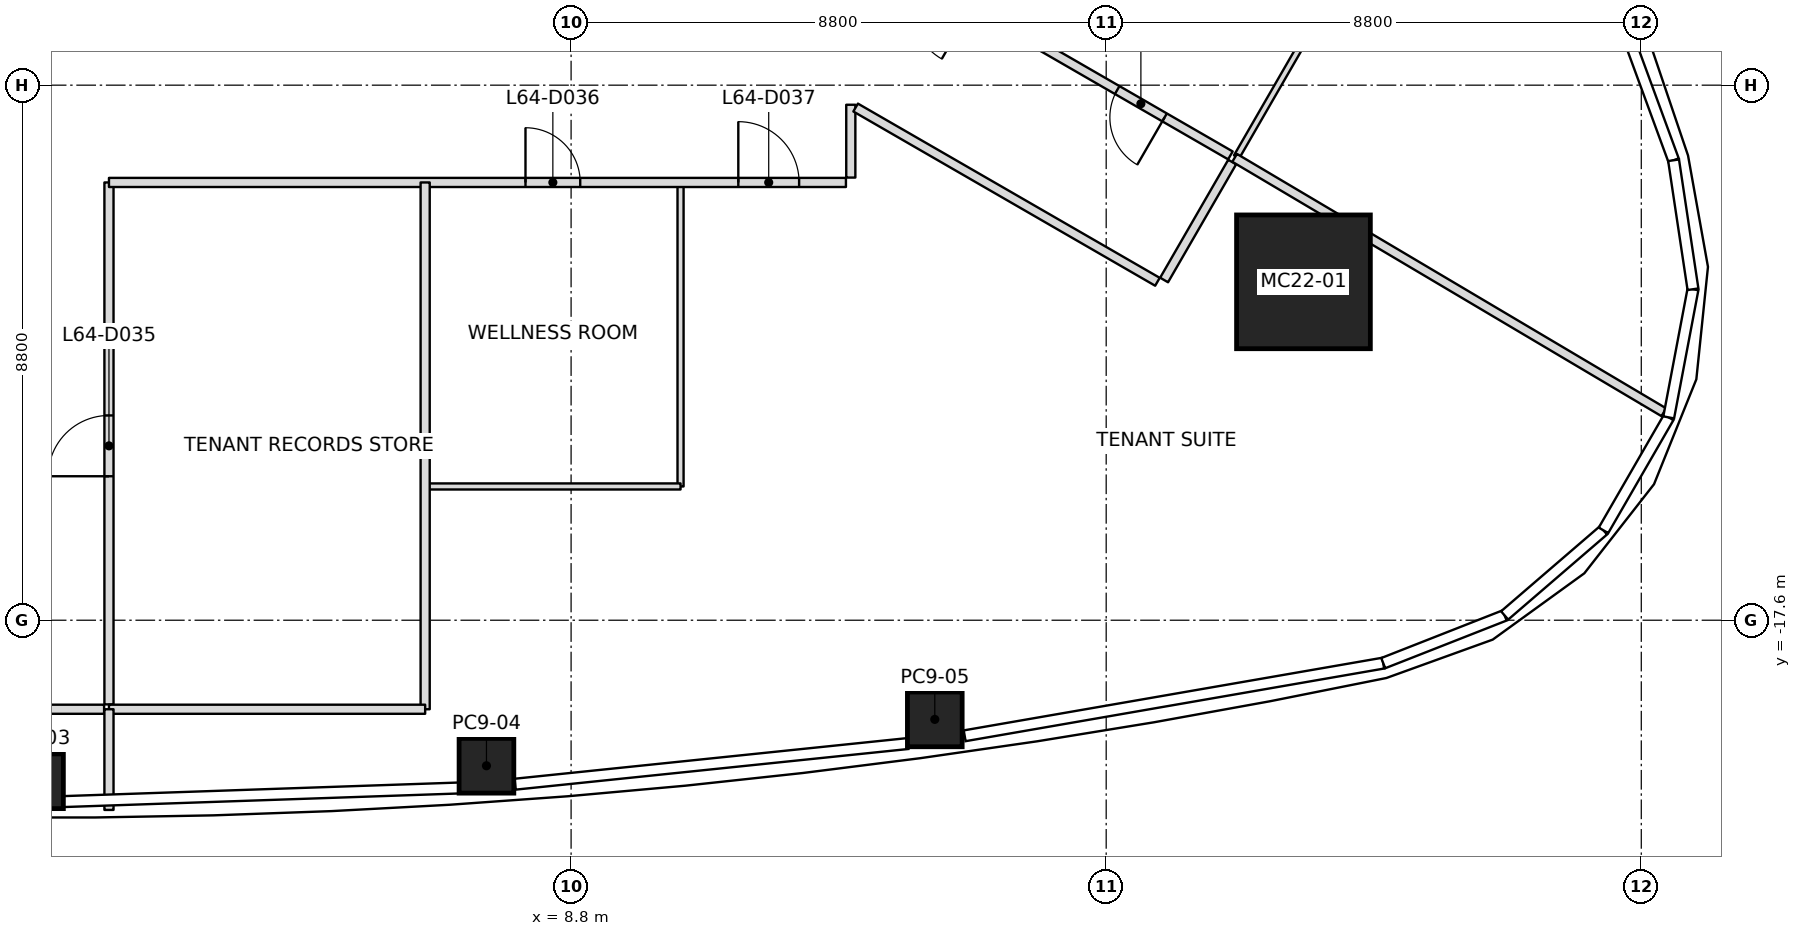
"""IFC4 building model, lengths in metres.
Left out: names, types, materials, properties, quantities, classifications, styles, units other than length and angle.
Written with IfcOpenShell. Run it as: python <this file> out.ifc"""

import sys

from ifc_helpers import new_model, si_unit, direction, frame, frame_2d, origin, origin_2d, place, context, subcontext, project, spatial, rectangle, extrude, element, fill, save


model = new_model("IFC4")
c1 = context("Model", 3, precision=1e-05, world=origin(), true_north=direction((0.0, 1.0)))
c2 = subcontext(c1, "Body", "Model", "MODEL_VIEW")
j1 = project(units=[si_unit("LENGTHUNIT", "METRE"), si_unit("PLANEANGLEUNIT", "RADIAN")], contexts=[c1])
p1 = place(None, origin())
s1 = spatial("IfcSite", under=j1, at=p1, CompositionType="ELEMENT")
p2 = place(p1, origin())
s2 = spatial("IfcBuilding", under=s1, at=p2, CompositionType="ELEMENT")
p3 = place(p2, frame((0.0, 0.0, 283.0)))
s3 = spatial("IfcBuildingStorey", under=s2, at=p3, CompositionType="ELEMENT", Elevation=283.0)
p4 = place(p3, frame((20.844, -12.034, 0.0), z_axis=(-0.027756720281, 0.01604399436, 0.999485945236), x_axis=(0.999614708015, 0.000445500311, 0.027753144871)))
e1 = element("IfcColumn", 1, at=p4, inside=s3, PredefinedType="COLUMN", context=c2, shape_type="SweptSolid", body=[
    extrude(rectangle(XDim=2.2, YDim=2.2, at=origin_2d()), origin(), (0.0, 0.0, 1.0), 4.002),
])
p5 = place(p3, frame((0.0, -20.249, 0.0), z_axis=(0.0, 0.01141283087, 0.999934871525), x_axis=(1.0, 0.0, 0.0)))
e2 = element("IfcColumn", 2, at=p5, inside=s3, PredefinedType="COLUMN", context=c2, shape_type="SweptSolid", body=[
    extrude(rectangle(XDim=0.9, YDim=0.9, at=origin_2d()), origin(), (0.0, 0.0, 1.0), 4.0),
])
p6 = place(p3, frame((7.408, -19.994, 0.0), z_axis=(-0.008788174922, 0.01116830563, 0.999899013366), x_axis=(0.997599705176, 0.068781048985, 0.0079997208)))
e3 = element("IfcColumn", 3, at=p6, inside=s3, PredefinedType="COLUMN", context=c2, shape_type="SweptSolid", body=[
    extrude(rectangle(XDim=0.9, YDim=0.9, at=origin_2d()), origin(), (0.0, 0.0, 1.0), 4.0),
])
p7 = place(p3, frame((14.781, -19.231, 0.0), z_axis=(-0.017452445502, 0.010434853779, 0.999793241612), x_axis=(0.990413210435, 0.137223335577, 0.015856505603)))
e4 = element("IfcColumn", 4, at=p7, inside=s3, PredefinedType="COLUMN", context=c2, shape_type="SweptSolid", body=[
    extrude(rectangle(XDim=0.9, YDim=0.9, at=origin_2d()), origin(), (0.0, 0.0, 1.0), 4.001),
])
p8 = place(p3, frame((6.4, -10.4, 0.0), z_axis=(0.0, 0.0, 1.0), x_axis=(0.0, -1.0, 0.0)))
e5 = element("IfcWall", 5, at=p8, inside=s3, PredefinedType="PARTITIONING", context=c2, shape_type="SweptSolid", body=[
    extrude(rectangle(XDim=8.664, YDim=0.15, at=frame_2d((4.332, 0.0))), origin(), (0.0, 0.0, 1.0), 3.45),
])
p9 = place(p3, frame((6.4, -19.064, 0.0), z_axis=(0.0, 0.0, 1.0), x_axis=(-1.0, 0.0, 0.0)))
e6 = element("IfcWall", 6, at=p9, inside=s3, PredefinedType="PARTITIONING", context=c2, shape_type="SweptSolid", body=[
    extrude(rectangle(XDim=5.2, YDim=0.15, at=frame_2d((2.6, 0.0))), origin(), (0.0, 0.0, 1.0), 3.393),
])
p10 = place(p3, frame((1.2, -19.064, 0.0), z_axis=(0.0, 0.0, 1.0), x_axis=(0.0, -1.0, 0.0)))
e7 = element("IfcWall", 7, at=p10, inside=s3, PredefinedType="PARTITIONING", context=c2, shape_type="SweptSolid", body=[
    extrude(rectangle(XDim=1.656, YDim=0.15, at=frame_2d((0.828, 0.0))), origin(), (0.0, 0.0, 1.0), 3.234),
])
p11 = place(p3, frame((19.712, -9.995, 0.0), z_axis=(0.0, 0.0, 1.0), x_axis=(0.860200661958, -0.509955705104, 0.0)))
e8 = element("IfcWall", 8, at=p11, inside=s3, PredefinedType="PARTITIONING", context=c2, shape_type="SweptSolid", body=[
    extrude(rectangle(XDim=8.206, YDim=0.15, at=frame_2d((4.103, 0.0))), origin(), (0.0, 0.0, 1.0), 3.234),
])
p12 = place(p3, frame((-1.12, -19.064, 0.0), z_axis=(0.0, 0.0, 1.0), x_axis=(1.0, 0.0, 0.0)))
e9 = element("IfcWall", 9, at=p12, inside=s3, PredefinedType="PARTITIONING", context=c2, shape_type="SweptSolid", body=[
    extrude(rectangle(XDim=2.24, YDim=0.15, at=frame_2d((1.12, 0.0))), origin(), (0.0, 0.0, 1.0), 3.45),
])
p13 = place(p3, frame((1.2, -18.984, 0.0), z_axis=(0.0, 0.0, 1.0), x_axis=(0.0, 1.0, 0.0)))
e10 = element("IfcWall", 10, at=p13, inside=s3, PredefinedType="PARTITIONING", context=c2, shape_type="SweptSolid", body=[
    extrude(rectangle(XDim=8.584, YDim=0.15, at=frame_2d((4.292, 0.0))), origin(), (0.0, 0.0, 1.0), 3.45),
])
p14 = place(p13, frame((3.752, 0.0, 0.0)))
e11 = element("IfcOpeningElement", 11, at=p14, cuts=e10, PredefinedType="OPENING", context=c2, shape_type="SweptSolid", body=[
    extrude(rectangle(XDim=1.0, YDim=2.1, at=frame_2d((0.5, 1.05))), frame((0.0, 0.075, 0.0), z_axis=(0.0, -1.0, 0.0), x_axis=(1.0, 0.0, 0.0)), (0.0, 0.0, 1.0), 0.15),
])
p15 = place(p3, frame((1.2, -10.4, 0.0), z_axis=(0.0, 0.0, 1.0), x_axis=(1.0, 0.0, 0.0)))
e12 = element("IfcWall", 12, at=p15, inside=s3, PredefinedType="PARTITIONING", context=c2, shape_type="SweptSolid", body=[
    extrude(rectangle(XDim=12.12, YDim=0.15, at=frame_2d((6.06, 0.0))), origin(), (0.0, 0.0, 1.0), 3.393),
])
p16 = place(p15, frame((6.85, 0.0, 0.0)))
e13 = element("IfcOpeningElement", 13, at=p16, cuts=e12, PredefinedType="OPENING", context=c2, shape_type="SweptSolid", body=[
    extrude(rectangle(XDim=0.9, YDim=2.1, at=frame_2d((0.45, 1.05))), frame((0.0, 0.075, 0.0), z_axis=(0.0, -1.0, 0.0), x_axis=(1.0, 0.0, 0.0)), (0.0, 0.0, 1.0), 0.15),
])
p17 = place(p15, frame((10.35, 0.0, 0.0)))
e14 = element("IfcOpeningElement", 14, at=p17, cuts=e12, PredefinedType="OPENING", context=c2, shape_type="SweptSolid", body=[
    extrude(rectangle(XDim=1.0, YDim=2.1, at=frame_2d((0.5, 1.05))), frame((0.0, 0.075, 0.0), z_axis=(0.0, -1.0, 0.0), x_axis=(1.0, 0.0, 0.0)), (0.0, 0.0, 1.0), 0.15),
])
p18 = place(p3, frame((13.4, -10.32, 0.0), z_axis=(0.0, 0.0, 1.0), x_axis=(0.0, 1.0, 0.0)))
e15 = element("IfcWall", 15, at=p18, inside=s3, PredefinedType="PARTITIONING", context=c2, shape_type="SweptSolid", body=[
    extrude(rectangle(XDim=1.198, YDim=0.15, at=frame_2d((0.599, 0.0))), origin(), (0.0, 0.0, 1.0), 3.233),
])
p19 = place(p3, frame((13.479, -9.168, 0.0), z_axis=(0.0, 0.0, 1.0), x_axis=(0.866038050133, -0.499978095242, 0.0)))
e16 = element("IfcWall", 16, at=p19, inside=s3, PredefinedType="PARTITIONING", context=c2, shape_type="SweptSolid", body=[
    extrude(rectangle(XDim=5.732, YDim=0.15, at=frame_2d((2.866, 0.0))), origin(), (0.0, 0.0, 1.0), 3.233),
])
p20 = place(p3, frame((19.643, -9.955, 0.0), z_axis=(0.0, 0.0, 1.0), x_axis=(-0.866040084029, 0.499974572209, 0.0)))
e17 = element("IfcWall", 17, at=p20, inside=s3, PredefinedType="PARTITIONING", context=c2, shape_type="SweptSolid", body=[
    extrude(rectangle(XDim=7.209, YDim=0.15, at=frame_2d((3.604, 0.0))), origin(), (0.0, 0.0, 1.0), 3.317),
])
p21 = place(p20, frame((1.25, 0.0, 0.0)))
e18 = element("IfcOpeningElement", 18, at=p21, cuts=e17, PredefinedType="OPENING", context=c2, shape_type="SweptSolid", body=[
    extrude(rectangle(XDim=0.9, YDim=2.1, at=frame_2d((0.45, 1.05))), frame((0.0, 0.075, 0.0), z_axis=(0.0, -1.0, 0.0), x_axis=(1.0, 0.0, 0.0)), (0.0, 0.0, 1.0), 0.15),
])
p22 = place(p20, frame((4.904, 0.0, 0.0)))
e19 = element("IfcOpeningElement", 19, at=p22, cuts=e17, PredefinedType="OPENING", context=c2, shape_type="SweptSolid", body=[
    extrude(rectangle(XDim=1.0, YDim=2.1, at=frame_2d((0.5, 1.05))), frame((0.0, 0.075, 0.0), z_axis=(0.0, -1.0, 0.0), x_axis=(1.0, 0.0, 0.0)), (0.0, 0.0, 1.0), 0.15),
])
p23 = place(p3, frame((18.552, -12.004, 0.0), z_axis=(0.0, 0.0, 1.0), x_axis=(0.500030632641, 0.866007717299, 0.0)))
e20 = element("IfcWall", 20, at=p23, inside=s3, PredefinedType="PARTITIONING", context=c2, shape_type="SweptSolid", body=[
    extrude(rectangle(XDim=2.24, YDim=0.15, at=frame_2d((1.12, 0.0))), origin(), (0.0, 0.0, 1.0), 3.233),
])
p24 = place(p3, frame((10.6, -10.43, 0.0), z_axis=(0.0, 0.0, 1.0), x_axis=(0.0, -1.0, 0.0)))
e21 = element("IfcWall", 21, at=p24, inside=s3, PredefinedType="PARTITIONING", context=c2, shape_type="SweptSolid", body=[
    extrude(rectangle(XDim=4.97, YDim=0.1, at=frame_2d((2.485, 0.0))), origin(), (0.0, 0.0, 1.0), 3.45),
])
p25 = place(p3, frame((10.6, -15.4, 0.0), z_axis=(0.0, 0.0, 1.0), x_axis=(-1.0, 0.0, 0.0)))
e22 = element("IfcWall", 22, at=p25, inside=s3, PredefinedType="PARTITIONING", context=c2, shape_type="SweptSolid", body=[
    extrude(rectangle(XDim=4.17, YDim=0.1, at=frame_2d((2.085, 0.0))), origin(), (0.0, 0.0, 1.0), 3.393),
])
p26 = place(p3, frame((21.83, -6.368, 0.0), z_axis=(0.0, 0.0, 1.0), x_axis=(-0.499992746786, -0.866029591389, 0.0)))
e23 = element("IfcWall", 23, at=p26, inside=s3, PredefinedType="PARTITIONING", context=c2, shape_type="SweptSolid", body=[
    extrude(rectangle(XDim=4.17, YDim=0.1, at=frame_2d((2.085, 0.0))), origin(), (0.0, 0.0, 1.0), 3.45),
])
p27 = place(p14, origin())
e24 = element("IfcDoor", 24, at=p27, inside=s3, OperationType="SINGLE_SWING_LEFT", PredefinedType="DOOR", context=c2, shape_type="SweptSolid", body=[
    extrude(rectangle(XDim=1.0, YDim=2.1, at=frame_2d((0.5, 1.05))), frame((0.0, 0.025, 0.0), z_axis=(0.0, -1.0, 0.0), x_axis=(1.0, 0.0, 0.0)), (0.0, 0.0, 1.0), 0.05),
])
fill(e11, e24)
p28 = place(p16, origin())
e25 = element("IfcDoor", 25, at=p28, inside=s3, OperationType="SINGLE_SWING_RIGHT", PredefinedType="DOOR", context=c2, shape_type="SweptSolid", body=[
    extrude(rectangle(XDim=0.9, YDim=2.1, at=frame_2d((0.45, 1.05))), frame((0.0, 0.025, 0.0), z_axis=(0.0, -1.0, 0.0), x_axis=(1.0, 0.0, 0.0)), (0.0, 0.0, 1.0), 0.05),
])
fill(e13, e25)
p29 = place(p17, origin())
e26 = element("IfcDoor", 26, at=p29, inside=s3, OperationType="SINGLE_SWING_RIGHT", PredefinedType="DOOR", context=c2, shape_type="SweptSolid", body=[
    extrude(rectangle(XDim=1.0, YDim=2.1, at=frame_2d((0.5, 1.05))), frame((0.0, 0.025, 0.0), z_axis=(0.0, -1.0, 0.0), x_axis=(1.0, 0.0, 0.0)), (0.0, 0.0, 1.0), 0.05),
])
fill(e14, e26)
p30 = place(p21, origin())
e27 = element("IfcDoor", 27, at=p30, inside=s3, OperationType="SINGLE_SWING_RIGHT", PredefinedType="DOOR", context=c2, shape_type="SweptSolid", body=[
    extrude(rectangle(XDim=0.9, YDim=2.1, at=frame_2d((0.45, 1.05))), frame((0.0, 0.025, 0.0), z_axis=(0.0, -1.0, 0.0), x_axis=(1.0, 0.0, 0.0)), (0.0, 0.0, 1.0), 0.05),
])
fill(e18, e27)
save(model, sys.argv[1])
